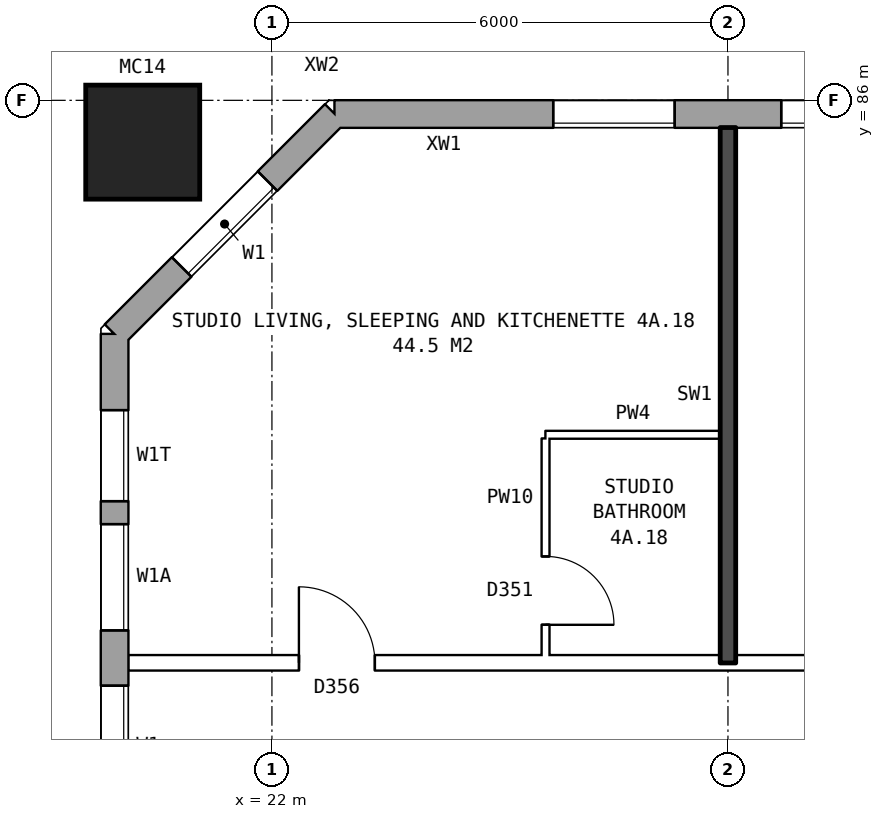
"""IFC4 building model, lengths in metres.
Left out: names, types, materials, properties, quantities, classifications, styles, units other than length and angle.
Written with IfcOpenShell. Run it as: python <this file> out.ifc"""

import sys

from ifc_helpers import new_model, si_unit, direction, frame, frame_2d, origin, origin_2d, place, context, subcontext, project, spatial, rectangle, hollow_rectangle, extrude, element, fill, save


model = new_model("IFC4")
c1 = context("Model", 3, precision=1e-05, world=origin(), true_north=direction((0.0, 1.0)))
c2 = subcontext(c1, "Body", "Model", "MODEL_VIEW")
j1 = project(units=[si_unit("LENGTHUNIT", "METRE"), si_unit("PLANEANGLEUNIT", "RADIAN")], contexts=[c1])
p1 = place(None, origin())
s1 = spatial("IfcSite", under=j1, at=p1, CompositionType="ELEMENT")
p2 = place(p1, origin())
s2 = spatial("IfcBuilding", under=s1, at=p2, CompositionType="ELEMENT")
p3 = place(p2, frame((0.0, 0.0, 19.5)))
s3 = spatial("IfcBuildingStorey", under=s2, at=p3, CompositionType="ELEMENT", Elevation=19.5)
p4 = place(p3, frame((20.3, 85.45, 0.0), z_axis=(0.0, 0.0, 1.0), x_axis=(1.0, 0.0, 0.0)))
e1 = element("IfcColumn", 1, at=p4, inside=s3, PredefinedType="COLUMN", context=c2, shape_type="SweptSolid", body=[
    extrude(hollow_rectangle(XDim=1.5, YDim=1.5, WallThickness=0.08, at=origin_2d()), origin(), (0.0, 0.0, 1.0), 3.1),
])
p5 = place(p3, frame((72.925, 85.82, 0.0), z_axis=(0.0, 0.0, 1.0), x_axis=(-1.0, 0.0, 0.0)))
e2 = element("IfcWall", 2, at=p5, inside=s3, PredefinedType="STANDARD", context=c2, shape_type="SweptSolid", body=[
    extrude(rectangle(XDim=50.101, YDim=0.36, at=frame_2d((25.05, 0.0))), origin(), (0.0, 0.0, 1.0), 2.85),
])
p6 = place(p5, frame((0.75, 0.0, 0.8)))
e3 = element("IfcOpeningElement", 3, at=p6, cuts=e2, PredefinedType="OPENING", context=c2, shape_type="SweptSolid", body=[
    extrude(rectangle(XDim=0.6, YDim=0.9, at=frame_2d((0.3, 0.45))), frame((0.0, 0.19, 0.0), z_axis=(0.0, -1.0, 0.0), x_axis=(1.0, 0.0, 0.0)), (0.0, 0.0, 1.0), 0.38),
])
p7 = place(p5, frame((3.625, 0.0, 0.8)))
e4 = element("IfcOpeningElement", 4, at=p7, cuts=e2, PredefinedType="OPENING", context=c2, shape_type="SweptSolid", body=[
    extrude(rectangle(XDim=1.6, YDim=1.8, at=frame_2d((0.8, 0.9))), frame((0.0, 0.19, 0.0), z_axis=(0.0, -1.0, 0.0), x_axis=(1.0, 0.0, 0.0)), (0.0, 0.0, 1.0), 0.38),
])
p8 = place(p5, frame((6.625, 0.0, 0.8)))
e5 = element("IfcOpeningElement", 5, at=p8, cuts=e2, PredefinedType="OPENING", context=c2, shape_type="SweptSolid", body=[
    extrude(rectangle(XDim=1.6, YDim=1.8, at=frame_2d((0.8, 0.9))), frame((0.0, 0.19, 0.0), z_axis=(0.0, -1.0, 0.0), x_axis=(1.0, 0.0, 0.0)), (0.0, 0.0, 1.0), 0.38),
])
p9 = place(p5, frame((9.625, 0.0, 0.8)))
e6 = element("IfcOpeningElement", 6, at=p9, cuts=e2, PredefinedType="OPENING", context=c2, shape_type="SweptSolid", body=[
    extrude(rectangle(XDim=1.6, YDim=1.8, at=frame_2d((0.8, 0.9))), frame((0.0, 0.19, 0.0), z_axis=(0.0, -1.0, 0.0), x_axis=(1.0, 0.0, 0.0)), (0.0, 0.0, 1.0), 0.38),
])
p10 = place(p5, frame((12.625, 0.0, 0.8)))
e7 = element("IfcOpeningElement", 7, at=p10, cuts=e2, PredefinedType="OPENING", context=c2, shape_type="SweptSolid", body=[
    extrude(rectangle(XDim=1.6, YDim=1.8, at=frame_2d((0.8, 0.9))), frame((0.0, 0.19, 0.0), z_axis=(0.0, -1.0, 0.0), x_axis=(1.0, 0.0, 0.0)), (0.0, 0.0, 1.0), 0.38),
])
p11 = place(p5, frame((15.625, 0.0, 0.8)))
e8 = element("IfcOpeningElement", 8, at=p11, cuts=e2, PredefinedType="OPENING", context=c2, shape_type="SweptSolid", body=[
    extrude(rectangle(XDim=1.6, YDim=1.8, at=frame_2d((0.8, 0.9))), frame((0.0, 0.19, 0.0), z_axis=(0.0, -1.0, 0.0), x_axis=(1.0, 0.0, 0.0)), (0.0, 0.0, 1.0), 0.38),
])
p12 = place(p5, frame((18.625, 0.0, 0.8)))
e9 = element("IfcOpeningElement", 9, at=p12, cuts=e2, PredefinedType="OPENING", context=c2, shape_type="SweptSolid", body=[
    extrude(rectangle(XDim=1.6, YDim=1.8, at=frame_2d((0.8, 0.9))), frame((0.0, 0.19, 0.0), z_axis=(0.0, -1.0, 0.0), x_axis=(1.0, 0.0, 0.0)), (0.0, 0.0, 1.0), 0.38),
])
p13 = place(p5, frame((21.625, 0.0, 0.8)))
e10 = element("IfcOpeningElement", 10, at=p13, cuts=e2, PredefinedType="OPENING", context=c2, shape_type="SweptSolid", body=[
    extrude(rectangle(XDim=1.6, YDim=1.8, at=frame_2d((0.8, 0.9))), frame((0.0, 0.19, 0.0), z_axis=(0.0, -1.0, 0.0), x_axis=(1.0, 0.0, 0.0)), (0.0, 0.0, 1.0), 0.38),
])
p14 = place(p5, frame((24.625, 0.0, 0.8)))
e11 = element("IfcOpeningElement", 11, at=p14, cuts=e2, PredefinedType="OPENING", context=c2, shape_type="SweptSolid", body=[
    extrude(rectangle(XDim=1.6, YDim=1.8, at=frame_2d((0.8, 0.9))), frame((0.0, 0.19, 0.0), z_axis=(0.0, -1.0, 0.0), x_axis=(1.0, 0.0, 0.0)), (0.0, 0.0, 1.0), 0.38),
])
p15 = place(p5, frame((27.625, 0.0, 0.8)))
e12 = element("IfcOpeningElement", 12, at=p15, cuts=e2, PredefinedType="OPENING", context=c2, shape_type="SweptSolid", body=[
    extrude(rectangle(XDim=1.6, YDim=1.8, at=frame_2d((0.8, 0.9))), frame((0.0, 0.19, 0.0), z_axis=(0.0, -1.0, 0.0), x_axis=(1.0, 0.0, 0.0)), (0.0, 0.0, 1.0), 0.38),
])
p16 = place(p5, frame((30.625, 0.0, 0.8)))
e13 = element("IfcOpeningElement", 13, at=p16, cuts=e2, PredefinedType="OPENING", context=c2, shape_type="SweptSolid", body=[
    extrude(rectangle(XDim=1.6, YDim=1.8, at=frame_2d((0.8, 0.9))), frame((0.0, 0.19, 0.0), z_axis=(0.0, -1.0, 0.0), x_axis=(1.0, 0.0, 0.0)), (0.0, 0.0, 1.0), 0.38),
])
p17 = place(p5, frame((33.625, 0.0, 0.8)))
e14 = element("IfcOpeningElement", 14, at=p17, cuts=e2, PredefinedType="OPENING", context=c2, shape_type="SweptSolid", body=[
    extrude(rectangle(XDim=1.6, YDim=1.8, at=frame_2d((0.8, 0.9))), frame((0.0, 0.19, 0.0), z_axis=(0.0, -1.0, 0.0), x_axis=(1.0, 0.0, 0.0)), (0.0, 0.0, 1.0), 0.38),
])
p18 = place(p5, frame((36.625, 0.0, 0.8)))
e15 = element("IfcOpeningElement", 15, at=p18, cuts=e2, PredefinedType="OPENING", context=c2, shape_type="SweptSolid", body=[
    extrude(rectangle(XDim=1.6, YDim=1.8, at=frame_2d((0.8, 0.9))), frame((0.0, 0.19, 0.0), z_axis=(0.0, -1.0, 0.0), x_axis=(1.0, 0.0, 0.0)), (0.0, 0.0, 1.0), 0.38),
])
p19 = place(p5, frame((39.625, 0.0, 0.8)))
e16 = element("IfcOpeningElement", 16, at=p19, cuts=e2, PredefinedType="OPENING", context=c2, shape_type="SweptSolid", body=[
    extrude(rectangle(XDim=1.6, YDim=1.8, at=frame_2d((0.8, 0.9))), frame((0.0, 0.19, 0.0), z_axis=(0.0, -1.0, 0.0), x_axis=(1.0, 0.0, 0.0)), (0.0, 0.0, 1.0), 0.38),
])
p20 = place(p5, frame((42.625, 0.0, 0.8)))
e17 = element("IfcOpeningElement", 17, at=p20, cuts=e2, PredefinedType="OPENING", context=c2, shape_type="SweptSolid", body=[
    extrude(rectangle(XDim=1.6, YDim=1.8, at=frame_2d((0.8, 0.9))), frame((0.0, 0.19, 0.0), z_axis=(0.0, -1.0, 0.0), x_axis=(1.0, 0.0, 0.0)), (0.0, 0.0, 1.0), 0.38),
])
p21 = place(p5, frame((45.625, 0.0, 0.8)))
e18 = element("IfcOpeningElement", 18, at=p21, cuts=e2, PredefinedType="OPENING", context=c2, shape_type="SweptSolid", body=[
    extrude(rectangle(XDim=1.6, YDim=1.8, at=frame_2d((0.8, 0.9))), frame((0.0, 0.19, 0.0), z_axis=(0.0, -1.0, 0.0), x_axis=(1.0, 0.0, 0.0)), (0.0, 0.0, 1.0), 0.38),
])
p22 = place(p5, frame((1.65, 0.0, 0.8)))
e19 = element("IfcOpeningElement", 19, at=p22, cuts=e2, PredefinedType="OPENING", context=c2, shape_type="SweptSolid", body=[
    extrude(rectangle(XDim=1.0, YDim=1.5, at=frame_2d((0.5, 0.75))), frame((0.0, 0.19, 0.0), z_axis=(0.0, -1.0, 0.0), x_axis=(1.0, 0.0, 0.0)), (0.0, 0.0, 1.0), 0.38),
])
p23 = place(p3, frame((22.825, 85.82, 0.0), z_axis=(0.0, 0.0, 1.0), x_axis=(-0.707106781187, -0.707106781187, 0.0)))
e20 = element("IfcWall", 20, at=p23, inside=s3, PredefinedType="STANDARD", context=c2, shape_type="SweptSolid", body=[
    extrude(rectangle(XDim=4.094, YDim=0.36, at=frame_2d((2.047, 0.0))), origin(), (0.0, 0.0, 1.0), 2.85),
])
p24 = place(p23, frame((1.247, 0.0, 0.8)))
e21 = element("IfcOpeningElement", 21, at=p24, cuts=e20, PredefinedType="OPENING", context=c2, shape_type="SweptSolid", body=[
    extrude(rectangle(XDim=1.6, YDim=1.8, at=frame_2d((0.8, 0.9))), frame((0.0, 0.19, 0.0), z_axis=(0.0, -1.0, 0.0), x_axis=(1.0, 0.0, 0.0)), (0.0, 0.0, 1.0), 0.38),
])
p25 = place(p3, frame((19.93, 82.925, 0.0), z_axis=(0.0, 0.0, 1.0), x_axis=(0.0, -1.0, 0.0)))
e22 = element("IfcWall", 22, at=p25, inside=s3, PredefinedType="STANDARD", context=c2, shape_type="SweptSolid", body=[
    extrude(rectangle(XDim=25.851, YDim=0.36, at=frame_2d((12.925, 0.0))), origin(), (0.0, 0.0, 1.0), 2.85),
])
p26 = place(p25, frame((1.0, 0.0, 0.8)))
e23 = element("IfcOpeningElement", 23, at=p26, cuts=e22, PredefinedType="OPENING", context=c2, shape_type="SweptSolid", body=[
    extrude(rectangle(XDim=1.2, YDim=0.9, at=frame_2d((0.6, 0.45))), frame((0.0, 0.19, 0.0), z_axis=(0.0, -1.0, 0.0), x_axis=(1.0, 0.0, 0.0)), (0.0, 0.0, 1.0), 0.38),
])
p27 = place(p25, frame((4.625, 0.0, 0.8)))
e24 = element("IfcOpeningElement", 24, at=p27, cuts=e22, PredefinedType="OPENING", context=c2, shape_type="SweptSolid", body=[
    extrude(rectangle(XDim=1.6, YDim=1.8, at=frame_2d((0.8, 0.9))), frame((0.0, 0.19, 0.0), z_axis=(0.0, -1.0, 0.0), x_axis=(1.0, 0.0, 0.0)), (0.0, 0.0, 1.0), 0.38),
])
p28 = place(p25, frame((7.625, 0.0, 0.8)))
e25 = element("IfcOpeningElement", 25, at=p28, cuts=e22, PredefinedType="OPENING", context=c2, shape_type="SweptSolid", body=[
    extrude(rectangle(XDim=1.6, YDim=1.8, at=frame_2d((0.8, 0.9))), frame((0.0, 0.19, 0.0), z_axis=(0.0, -1.0, 0.0), x_axis=(1.0, 0.0, 0.0)), (0.0, 0.0, 1.0), 0.38),
])
p29 = place(p25, frame((10.625, 0.0, 0.8)))
e26 = element("IfcOpeningElement", 26, at=p29, cuts=e22, PredefinedType="OPENING", context=c2, shape_type="SweptSolid", body=[
    extrude(rectangle(XDim=1.6, YDim=1.8, at=frame_2d((0.8, 0.9))), frame((0.0, 0.19, 0.0), z_axis=(0.0, -1.0, 0.0), x_axis=(1.0, 0.0, 0.0)), (0.0, 0.0, 1.0), 0.38),
])
p30 = place(p25, frame((13.625, 0.0, 0.8)))
e27 = element("IfcOpeningElement", 27, at=p30, cuts=e22, PredefinedType="OPENING", context=c2, shape_type="SweptSolid", body=[
    extrude(rectangle(XDim=1.6, YDim=1.8, at=frame_2d((0.8, 0.9))), frame((0.0, 0.19, 0.0), z_axis=(0.0, -1.0, 0.0), x_axis=(1.0, 0.0, 0.0)), (0.0, 0.0, 1.0), 0.38),
])
p31 = place(p25, frame((16.625, 0.0, 0.8)))
e28 = element("IfcOpeningElement", 28, at=p31, cuts=e22, PredefinedType="OPENING", context=c2, shape_type="SweptSolid", body=[
    extrude(rectangle(XDim=1.6, YDim=1.8, at=frame_2d((0.8, 0.9))), frame((0.0, 0.19, 0.0), z_axis=(0.0, -1.0, 0.0), x_axis=(1.0, 0.0, 0.0)), (0.0, 0.0, 1.0), 0.38),
])
p32 = place(p25, frame((19.625, 0.0, 0.8)))
e29 = element("IfcOpeningElement", 29, at=p32, cuts=e22, PredefinedType="OPENING", context=c2, shape_type="SweptSolid", body=[
    extrude(rectangle(XDim=1.6, YDim=1.8, at=frame_2d((0.8, 0.9))), frame((0.0, 0.19, 0.0), z_axis=(0.0, -1.0, 0.0), x_axis=(1.0, 0.0, 0.0)), (0.0, 0.0, 1.0), 0.38),
])
p33 = place(p25, frame((21.725, 0.0, 0.8)))
e30 = element("IfcOpeningElement", 30, at=p33, cuts=e22, PredefinedType="OPENING", context=c2, shape_type="SweptSolid", body=[
    extrude(rectangle(XDim=1.6, YDim=1.8, at=frame_2d((0.8, 0.9))), frame((0.0, 0.19, 0.0), z_axis=(0.0, -1.0, 0.0), x_axis=(1.0, 0.0, 0.0)), (0.0, 0.0, 1.0), 0.38),
])
p34 = place(p25, frame((2.5, 0.0, 0.8)))
e31 = element("IfcOpeningElement", 31, at=p34, cuts=e22, PredefinedType="OPENING", context=c2, shape_type="SweptSolid", body=[
    extrude(rectangle(XDim=1.4, YDim=1.8, at=frame_2d((0.7, 0.9))), frame((0.0, 0.19, 0.0), z_axis=(0.0, -1.0, 0.0), x_axis=(1.0, 0.0, 0.0)), (0.0, 0.0, 1.0), 0.38),
])
p35 = place(p25, frame((23.625, 0.0, 0.8)))
e32 = element("IfcOpeningElement", 32, at=p35, cuts=e22, PredefinedType="OPENING", context=c2, shape_type="SweptSolid", body=[
    extrude(rectangle(XDim=0.6, YDim=1.2, at=frame_2d((0.3, 0.6))), frame((0.0, 0.19, 0.0), z_axis=(0.0, -1.0, 0.0), x_axis=(1.0, 0.0, 0.0)), (0.0, 0.0, 1.0), 0.38),
])
p36 = place(p3, frame((20.11, 78.6, 0.0), z_axis=(0.0, 0.0, 1.0), x_axis=(1.0, 0.0, 0.0)))
e33 = element("IfcWall", 33, at=p36, inside=s3, PredefinedType="PARTITIONING", context=c2, shape_type="SweptSolid", body=[
    extrude(rectangle(XDim=25.79, YDim=0.2, at=frame_2d((12.895, 0.0))), origin(), (0.0, 0.0, 1.0), 2.85),
])
p37 = place(p36, frame((22.34, 0.0, 0.0)))
e34 = element("IfcOpeningElement", 34, at=p37, cuts=e33, PredefinedType="OPENING", context=c2, shape_type="SweptSolid", body=[
    extrude(rectangle(XDim=1.0, YDim=2.1, at=frame_2d((0.5, 1.05))), frame((0.0, 0.11, 0.0), z_axis=(0.0, -1.0, 0.0), x_axis=(1.0, 0.0, 0.0)), (0.0, 0.0, 1.0), 0.22),
])
p38 = place(p36, frame((10.39, 0.0, 0.0)))
e35 = element("IfcOpeningElement", 35, at=p38, cuts=e33, PredefinedType="OPENING", context=c2, shape_type="SweptSolid", body=[
    extrude(rectangle(XDim=1.0, YDim=2.1, at=frame_2d((0.5, 1.05))), frame((0.0, 0.11, 0.0), z_axis=(0.0, -1.0, 0.0), x_axis=(1.0, 0.0, 0.0)), (0.0, 0.0, 1.0), 0.22),
])
p39 = place(p36, frame((2.245, 0.0, 0.0)))
e36 = element("IfcOpeningElement", 36, at=p39, cuts=e33, PredefinedType="OPENING", context=c2, shape_type="SweptSolid", body=[
    extrude(rectangle(XDim=1.0, YDim=2.1, at=frame_2d((0.5, 1.05))), frame((0.0, 0.11, 0.0), z_axis=(0.0, -1.0, 0.0), x_axis=(1.0, 0.0, 0.0)), (0.0, 0.0, 1.0), 0.22),
])
p40 = place(p3, frame((25.6, 81.6, 0.0), z_axis=(0.0, 0.0, 1.0), x_axis=(1.0, 0.0, 0.0)))
e37 = element("IfcWall", 37, at=p40, inside=s3, PredefinedType="PARTITIONING", context=c2, shape_type="SweptSolid", body=[
    extrude(rectangle(XDim=2.3, YDim=0.1, at=frame_2d((1.15, 0.0))), origin(), (0.0, 0.0, 1.0), 2.85),
])
p41 = place(p3, frame((25.6, 78.7, 0.0), z_axis=(0.0, 0.0, 1.0), x_axis=(0.0, 1.0, 0.0)))
e38 = element("IfcWall", 38, at=p41, inside=s3, PredefinedType="PARTITIONING", context=c2, shape_type="SweptSolid", body=[
    extrude(rectangle(XDim=2.85, YDim=0.1, at=frame_2d((1.425, 0.0))), origin(), (0.0, 0.0, 1.0), 2.85),
])
p42 = place(p41, frame((0.4, 0.0, 0.0)))
e39 = element("IfcOpeningElement", 39, at=p42, cuts=e38, PredefinedType="OPENING", context=c2, shape_type="SweptSolid", body=[
    extrude(rectangle(XDim=0.9, YDim=2.1, at=frame_2d((0.45, 1.05))), frame((0.0, 0.06, 0.0), z_axis=(0.0, -1.0, 0.0), x_axis=(1.0, 0.0, 0.0)), (0.0, 0.0, 1.0), 0.12),
])
p43 = place(p3, frame((28.0, 78.6, 0.0), z_axis=(0.0, 0.0, 1.0), x_axis=(0.0, 1.0, 0.0)))
e40 = element("IfcWall", 40, at=p43, inside=s3, PredefinedType="SOLIDWALL", context=c2, shape_type="SweptSolid", body=[
    extrude(rectangle(XDim=7.04, YDim=0.2, at=frame_2d((3.52, 0.0))), origin(), (0.0, 0.0, 1.0), 2.85),
])
p44 = place(p20, origin())
e41 = element("IfcWindow", 41, at=p44, inside=s3, PartitioningType="SINGLE_PANEL", PredefinedType="WINDOW", context=c2, shape_type="SweptSolid", body=[
    extrude(rectangle(XDim=1.6, YDim=1.8, at=frame_2d((0.8, 0.9))), frame((0.0, 0.15, 0.0), z_axis=(0.0, -1.0, 0.0), x_axis=(1.0, 0.0, 0.0)), (0.0, 0.0, 1.0), 0.06),
])
fill(e17, e41)
p45 = place(p21, origin())
e42 = element("IfcWindow", 42, at=p45, inside=s3, PartitioningType="SINGLE_PANEL", PredefinedType="WINDOW", context=c2, shape_type="SweptSolid", body=[
    extrude(rectangle(XDim=1.6, YDim=1.8, at=frame_2d((0.8, 0.9))), frame((0.0, 0.15, 0.0), z_axis=(0.0, -1.0, 0.0), x_axis=(1.0, 0.0, 0.0)), (0.0, 0.0, 1.0), 0.06),
])
fill(e18, e42)
p46 = place(p24, origin())
e43 = element("IfcWindow", 43, at=p46, inside=s3, PartitioningType="SINGLE_PANEL", PredefinedType="WINDOW", context=c2, shape_type="SweptSolid", body=[
    extrude(rectangle(XDim=1.6, YDim=1.8, at=frame_2d((0.8, 0.9))), frame((0.0, 0.15, 0.0), z_axis=(0.0, -1.0, 0.0), x_axis=(1.0, 0.0, 0.0)), (0.0, 0.0, 1.0), 0.06),
])
fill(e21, e43)
p47 = place(p26, origin())
e44 = element("IfcWindow", 44, at=p47, inside=s3, PartitioningType="SINGLE_PANEL", PredefinedType="WINDOW", context=c2, shape_type="SweptSolid", body=[
    extrude(rectangle(XDim=1.2, YDim=0.9, at=frame_2d((0.6, 0.45))), frame((0.0, 0.15, 0.0), z_axis=(0.0, -1.0, 0.0), x_axis=(1.0, 0.0, 0.0)), (0.0, 0.0, 1.0), 0.06),
])
fill(e23, e44)
p48 = place(p27, origin())
e45 = element("IfcWindow", 45, at=p48, inside=s3, PartitioningType="SINGLE_PANEL", PredefinedType="WINDOW", context=c2, shape_type="SweptSolid", body=[
    extrude(rectangle(XDim=1.6, YDim=1.8, at=frame_2d((0.8, 0.9))), frame((0.0, 0.15, 0.0), z_axis=(0.0, -1.0, 0.0), x_axis=(1.0, 0.0, 0.0)), (0.0, 0.0, 1.0), 0.06),
])
fill(e24, e45)
p49 = place(p39, origin())
e46 = element("IfcDoor", 46, at=p49, inside=s3, OperationType="SINGLE_SWING_LEFT", PredefinedType="DOOR", context=c2, shape_type="SweptSolid", body=[
    extrude(rectangle(XDim=1.0, YDim=2.1, at=frame_2d((0.5, 1.05))), frame((0.0, 0.025, 0.0), z_axis=(0.0, -1.0, 0.0), x_axis=(1.0, 0.0, 0.0)), (0.0, 0.0, 1.0), 0.05),
])
fill(e36, e46)
p50 = place(p42, frame((0.9, 0.0, 0.0), z_axis=(0.0, 0.0, 1.0), x_axis=(-1.0, 0.0, 0.0)))
e47 = element("IfcDoor", 47, at=p50, inside=s3, OperationType="SINGLE_SWING_RIGHT", PredefinedType="DOOR", context=c2, shape_type="SweptSolid", body=[
    extrude(rectangle(XDim=0.9, YDim=2.1, at=frame_2d((0.45, 1.05))), frame((0.0, 0.025, 0.0), z_axis=(0.0, -1.0, 0.0), x_axis=(1.0, 0.0, 0.0)), (0.0, 0.0, 1.0), 0.05),
])
fill(e39, e47)
p51 = place(p34, origin())
e48 = element("IfcWindow", 48, at=p51, inside=s3, PartitioningType="SINGLE_PANEL", PredefinedType="WINDOW", context=c2, shape_type="SweptSolid", body=[
    extrude(rectangle(XDim=1.4, YDim=1.8, at=frame_2d((0.7, 0.9))), frame((0.0, 0.15, 0.0), z_axis=(0.0, -1.0, 0.0), x_axis=(1.0, 0.0, 0.0)), (0.0, 0.0, 1.0), 0.06),
])
fill(e31, e48)
save(model, sys.argv[1])
